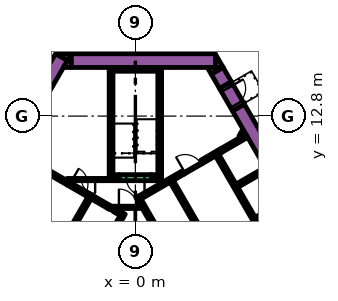
"""IFC4 building model, lengths in metres.
Left out: names, types, materials, properties, quantities, classifications, styles, units other than length and angle.
Written with IfcOpenShell. Run it as: python <this file> out.ifc"""

import sys

from ifc_helpers import new_model, si_unit, direction, frame, frame_2d, origin, place, context, subcontext, project, spatial, polyline, rectangle, outline, extrude, element, fill, save


model = new_model("IFC4")
c1 = context("Model", 3, precision=1e-05, world=origin(), true_north=direction((0.0, 1.0)))
c2 = subcontext(c1, "Body", "Model", "MODEL_VIEW")
j1 = project(units=[si_unit("LENGTHUNIT", "METRE"), si_unit("PLANEANGLEUNIT", "RADIAN")], contexts=[c1])
p1 = place(None, origin())
s1 = spatial("IfcSite", under=j1, at=p1, CompositionType="ELEMENT")
p2 = place(p1, origin())
s2 = spatial("IfcBuilding", under=s1, at=p2, CompositionType="ELEMENT")
p3 = place(p2, frame((0.0, 0.0, 16.2)))
s3 = spatial("IfcBuildingStorey", under=s2, at=p3, CompositionType="ELEMENT", Elevation=16.2)
p4 = place(p3, frame((6.776, 13.364, 0.0), z_axis=(0.0, 0.0, 1.0), x_axis=(0.500004177138, -0.8660229921, 0.0)))
e1 = element("IfcWall", 1, at=p4, inside=s3, PredefinedType="SOLIDWALL", context=c2, shape_type="SweptSolid", body=[
    extrude(rectangle(XDim=20.204, YDim=0.9, at=frame_2d((10.102, 0.0))), origin(), (0.0, 0.0, 1.0), 5.4),
])
p5 = place(p3, frame((-15.36, -1.503, 0.0), z_axis=(0.0, 0.0, 1.0), x_axis=(0.50000389221, 0.866023156604, 0.0)))
e2 = element("IfcWall", 2, at=p5, inside=s3, PredefinedType="SOLIDWALL", context=c2, shape_type="SweptSolid", body=[
    extrude(rectangle(XDim=21.0, YDim=0.9, at=frame_2d((10.5, 0.0))), origin(), (0.0, 0.0, 1.0), 5.4),
])
p6 = place(p3, origin())
e3 = element("IfcWall", 3, at=p6, inside=s3, PredefinedType="SOLIDWALL", context=c2, shape_type="SweptSolid", body=[
    extrude(outline(polyline([(-4.215, 16.9), (-4.469, 16.46), (-5.231, 16.9), (-4.215, 16.9)])), origin(), (0.0, 0.0, 1.0), 5.4),
])
p7 = place(p3, frame((-4.224, 16.45, 0.0), z_axis=(0.0, 0.0, 1.0), x_axis=(1.0, 0.0, 0.0)))
e4 = element("IfcWall", 4, at=p7, inside=s3, PredefinedType="SOLIDWALL", context=c2, shape_type="SweptSolid", body=[
    extrude(rectangle(XDim=9.488, YDim=0.9, at=frame_2d((4.744, 0.0))), origin(), (0.0, 0.0, 1.0), 5.4),
])
e5 = element("IfcWall", 5, at=p6, inside=s3, PredefinedType="SOLIDWALL", context=c2, shape_type="SweptSolid", body=[
    extrude(outline(polyline([(5.265, 16.0), (5.265, 16.88), (5.773, 16.0), (5.265, 16.0)])), origin(), (0.0, 0.0, 1.0), 5.4),
])
e6 = element("IfcWall", 6, at=p6, inside=s3, PredefinedType="SOLIDWALL", context=c2, shape_type="SweptSolid", body=[
    extrude(outline(polyline([(-4.734, 16.0), (-4.226, 16.88), (-4.226, 16.0), (-4.734, 16.0)])), origin(), (0.0, 0.0, 1.0), 5.4),
])
p8 = place(p3, frame((5.926, 14.836, 0.0), z_axis=(0.0, 0.0, 1.0), x_axis=(-0.500076735116, 0.865981096212, 0.0)))
e7 = element("IfcWall", 7, at=p8, inside=s3, PredefinedType="SOLIDWALL", context=c2, shape_type="SweptSolid", body=[
    extrude(rectangle(XDim=1.094, YDim=0.9, at=frame_2d((0.547, 0.0))), origin(), (0.0, 0.0, 1.0), 5.4),
])
e8 = element("IfcWall", 8, at=p6, inside=s3, PredefinedType="SOLIDWALL", context=c2, shape_type="SweptSolid", body=[
    extrude(outline(polyline([(4.734, 16.0), (5.75, 16.0), (4.988, 15.56), (4.734, 16.0)])), origin(), (0.0, 0.0, 1.0), 5.4),
])
p9 = place(p3, frame((-1.725, 15.875, 0.0), z_axis=(0.0, 0.0, 1.0), x_axis=(1.0, 0.0, 0.0)))
e9 = element("IfcWall", 9, at=p9, inside=s3, PredefinedType="SOLIDWALL", context=c2, shape_type="SweptSolid", body=[
    extrude(rectangle(XDim=3.45, YDim=0.25, at=frame_2d((1.725, 0.0))), origin(), (0.0, 0.0, 1.0), 5.4),
])
p10 = place(p3, frame((1.6, 8.95, 0.0), z_axis=(0.0, 0.0, 1.0), x_axis=(0.0, 1.0, 0.0)))
e10 = element("IfcWall", 10, at=p10, inside=s3, PredefinedType="SOLIDWALL", context=c2, shape_type="SweptSolid", body=[
    extrude(rectangle(XDim=6.8, YDim=0.25, at=frame_2d((3.4, 0.0))), origin(), (0.0, 0.0, 1.0), 5.4),
])
p11 = place(p3, frame((1.05, 8.825, 0.0), z_axis=(0.0, 0.0, 1.0), x_axis=(1.0, 0.0, 0.0)))
e11 = element("IfcWall", 11, at=p11, inside=s3, PredefinedType="SOLIDWALL", context=c2, shape_type="SweptSolid", body=[
    extrude(rectangle(XDim=0.675, YDim=0.25, at=frame_2d((0.337, 0.0))), origin(), (0.0, 0.0, 1.0), 5.4),
])
p12 = place(p3, frame((-1.6, 8.7, 0.0), z_axis=(0.0, 0.0, 1.0), x_axis=(0.0, 1.0, 0.0)))
e12 = element("IfcWall", 12, at=p12, inside=s3, PredefinedType="SOLIDWALL", context=c2, shape_type="SweptSolid", body=[
    extrude(rectangle(XDim=7.05, YDim=0.25, at=frame_2d((3.525, 0.0))), origin(), (0.0, 0.0, 1.0), 5.4),
])
p13 = place(p3, frame((-1.475, 8.825, 0.0), z_axis=(0.0, 0.0, 1.0), x_axis=(1.0, 0.0, 0.0)))
e13 = element("IfcWall", 13, at=p13, inside=s3, PredefinedType="SOLIDWALL", context=c2, shape_type="SweptSolid", body=[
    extrude(rectangle(XDim=0.425, YDim=0.25, at=frame_2d((0.212, 0.0))), origin(), (0.0, 0.0, 1.0), 5.4),
])
e14 = element("IfcWall", 14, at=p6, inside=s3, PredefinedType="SOLIDWALL", context=c2, shape_type="SweptSolid", body=[
    extrude(outline(polyline([(6.552, -3.348), (6.677, -3.564), (6.46, -3.689), (0.448, 6.725), (0.565, 6.725), (0.566, 6.725), (0.566, 6.725), (0.566, 6.875), (0.566, 6.875), (0.565, 6.875), (0.361, 6.875), (0.035, 7.439), (0.252, 7.564), (0.377, 7.348), (6.552, -3.348)])), origin(), (0.0, 0.0, 1.0), 5.4),
])
p14 = place(p3, frame((11.553, -0.46, 0.0), z_axis=(0.0, 0.0, 1.0), x_axis=(-0.500004791531, 0.866022637375, 0.0)))
e15 = element("IfcWall", 15, at=p14, inside=s3, PredefinedType="SOLIDWALL", context=c2, shape_type="SweptSolid", body=[
    extrude(rectangle(XDim=12.6, YDim=0.25, at=frame_2d((6.3, 0.0))), origin(), (0.0, 0.0, 1.0), 5.4),
])
p15 = place(p3, frame((4.358, 9.791, 0.0), z_axis=(0.0, 0.0, 1.0), x_axis=(0.866100000774, 0.49987077196, 0.0)))
e16 = element("IfcWall", 16, at=p15, inside=s3, PredefinedType="SOLIDWALL", context=c2, shape_type="SweptSolid", body=[
    extrude(rectangle(XDim=0.95, YDim=0.25, at=frame_2d((0.475, 0.0))), origin(), (0.0, 0.0, 1.0), 5.4),
])
p16 = place(p3, frame((0.314, 7.456, 0.0), z_axis=(0.0, 0.0, 1.0), x_axis=(0.866013897511, 0.50001992892, 0.0)))
e17 = element("IfcWall", 17, at=p16, inside=s3, PredefinedType="SOLIDWALL", context=c2, shape_type="SweptSolid", body=[
    extrude(rectangle(XDim=3.268, YDim=0.25, at=frame_2d((1.634, 0.0))), origin(), (0.0, 0.0, 1.0), 5.4),
])
p17 = place(p3, frame((5.469, 10.577, 0.0), z_axis=(0.0, 0.0, 1.0), x_axis=(0.499919672301, -0.866071776036, 0.0)))
e18 = element("IfcWall", 18, at=p17, inside=s3, PredefinedType="SOLIDWALL", context=c2, shape_type="SweptSolid", body=[
    extrude(rectangle(XDim=0.25, YDim=0.25, at=frame_2d((0.125, 0.0))), origin(), (0.0, 0.0, 1.0), 5.4),
])
p18 = place(p3, frame((5.64, 10.531, 0.0), z_axis=(0.0, 0.0, 1.0), x_axis=(0.866000020948, 0.500043961785, 0.0)))
e19 = element("IfcWall", 19, at=p18, inside=s3, PredefinedType="SOLIDWALL", context=c2, shape_type="SweptSolid", body=[
    extrude(rectangle(XDim=1.95, YDim=0.25, at=frame_2d((0.975, 0.0))), origin(), (0.0, 0.0, 1.0), 5.4),
])
for number, where, z_axis, x_axis in (
    (20, (8.589, 9.323, 0.0), (0.0, 0.0, 1.0), (-0.866, -0.5, 0.0)),
    (21, (7.944, 6.041, 0.0), (0.0, 0.0, 1.0), (0.866, 0.5, 0.0)),
):
    element("IfcWall", number, at=place(p3, frame(where, z_axis=z_axis, x_axis=x_axis)), inside=s3, PredefinedType="SOLIDWALL", context=c2, shape_type="SweptSolid", body=[
        extrude(rectangle(XDim=2.2, YDim=0.25, at=frame_2d((1.1, 0.0))), origin(), (0.0, 0.0, 1.0), 5.4),
    ])
p19 = place(p3, frame((-8.06, -1.311, 0.0), z_axis=(0.0, 0.0, 1.0), x_axis=(0.50000273126, 0.866023826885, 0.0)))
e22 = element("IfcWall", 22, at=p19, inside=s3, PredefinedType="SOLIDWALL", context=c2, shape_type="SweptSolid", body=[
    extrude(rectangle(XDim=10.33, YDim=0.25, at=frame_2d((5.165, 0.0))), origin(), (0.0, 0.0, 1.0), 5.4),
])
p20 = place(p3, frame((-1.758, 6.835, 0.0), z_axis=(0.0, 0.0, 1.0), x_axis=(0.865982457891, -0.500074377092, 0.0)))
e23 = element("IfcWall", 23, at=p20, inside=s3, PredefinedType="SOLIDWALL", context=c2, shape_type="SweptSolid", body=[
    extrude(rectangle(XDim=0.2, YDim=0.25, at=frame_2d((0.1, 0.0))), origin(), (0.0, 0.0, 1.0), 5.4),
])
p21 = place(p3, frame((-1.76, 6.836, 0.0), z_axis=(0.0, 0.0, 1.0), x_axis=(-0.865952863304, 0.500125622755, 0.0)))
e24 = element("IfcWall", 24, at=p21, inside=s3, PredefinedType="SOLIDWALL", context=c2, shape_type="SweptSolid", body=[
    extrude(rectangle(XDim=1.258, YDim=0.25, at=frame_2d((0.629, 0.0))), origin(), (0.0, 0.0, 1.0), 5.4),
])
p22 = place(p3, frame((-0.728, 6.24, 0.0), z_axis=(0.0, 0.0, 1.0), x_axis=(-0.865955664968, 0.500120771724, 0.0)))
e25 = element("IfcWall", 25, at=p22, inside=s3, PredefinedType="SOLIDWALL", context=c2, shape_type="SweptSolid", body=[
    extrude(rectangle(XDim=0.778, YDim=0.25, at=frame_2d((0.389, 0.0))), origin(), (0.0, 0.0, 1.0), 5.4),
])
e26 = element("IfcWall", 26, at=p6, inside=s3, PredefinedType="SOLIDWALL", context=c2, shape_type="SweptSolid", body=[
    extrude(outline(polyline([(-3.128, 7.481), (-3.259, 7.557), (-3.134, 7.773), (-3.003, 7.698), (-3.128, 7.481)])), origin(), (0.0, 0.0, 1.0), 5.4),
])
p23 = place(p3, frame((-7.959, 10.415, 0.0), z_axis=(0.0, 0.0, 1.0), x_axis=(0.866020958405, -0.500007699544, 0.0)))
e27 = element("IfcWall", 27, at=p23, inside=s3, PredefinedType="SOLIDWALL", context=c2, shape_type="SweptSolid", body=[
    extrude(rectangle(XDim=4.1, YDim=0.25, at=frame_2d((2.05, 0.0))), origin(), (0.0, 0.0, 1.0), 5.4),
])
p24 = place(p3, frame((-3.997, 8.625, 0.0), z_axis=(0.0, 0.0, 1.0), x_axis=(-1.0, 0.0, 0.0)))
e28 = element("IfcWall", 28, at=p24, inside=s3, PredefinedType="PARTITIONING", context=c2, shape_type="SweptSolid", body=[
    extrude(rectangle(XDim=0.502, YDim=0.15, at=frame_2d((0.251, 0.0))), origin(), (0.0, 0.0, 1.0), 4.1),
])
p25 = place(p3, frame((-2.196, 8.625, 0.0), z_axis=(0.0, 0.0, 1.0), x_axis=(1.0, 0.0, 0.0)))
e29 = element("IfcWall", 29, at=p25, inside=s3, PredefinedType="PARTITIONING", context=c2, shape_type="SweptSolid", body=[
    extrude(rectangle(XDim=1.146, YDim=0.15, at=frame_2d((0.573, 0.0))), origin(), (0.0, 0.0, 1.0), 4.1),
])
p26 = place(p3, frame((1.05, 8.625, 0.0), z_axis=(0.0, 0.0, 1.0), x_axis=(1.0, 0.0, 0.0)))
e30 = element("IfcWall", 30, at=p26, inside=s3, PredefinedType="PARTITIONING", context=c2, shape_type="SweptSolid", body=[
    extrude(rectangle(XDim=0.514, YDim=0.15, at=frame_2d((0.257, 0.0))), origin(), (0.0, 0.0, 1.0), 4.1),
])
p27 = place(p3, frame((6.872, 11.45, 0.0), z_axis=(0.0, 0.0, 1.0), x_axis=(0.499846793097, 0.866113839764, 0.0)))
e31 = element("IfcWall", 31, at=p27, inside=s3, PredefinedType="PARTITIONING", context=c2, shape_type="SweptSolid", body=[
    extrude(rectangle(XDim=0.453, YDim=0.15, at=frame_2d((0.227, 0.0))), origin(), (0.0, 0.0, 1.0), 4.1),
])
p28 = place(p3, frame((7.131, 11.6, 0.0), z_axis=(0.0, 0.0, 1.0), x_axis=(0.498600033135, 0.866832167699, 0.0)))
e32 = element("IfcWall", 32, at=p28, inside=s3, PredefinedType="PARTITIONING", context=c2, shape_type="SweptSolid", body=[
    extrude(rectangle(XDim=0.107, YDim=0.15, at=frame_2d((0.053, 0.0))), origin(), (0.0, 0.0, 1.0), 4.1),
])
p29 = place(p3, frame((8.565, -2.185, 0.0), z_axis=(0.0, 0.0, 1.0), x_axis=(-0.499997954832, 0.866026584559, 0.0)))
e33 = element("IfcWall", 33, at=p29, inside=s3, PredefinedType="SOLIDWALL", context=c2, shape_type="SweptSolid", body=[
    extrude(rectangle(XDim=12.35, YDim=0.25, at=frame_2d((6.175, 0.0))), origin(), (0.0, 0.0, 1.0), 5.4),
])
p30 = place(p29, frame((5.725, 0.0, 0.0)))
e34 = element("IfcOpeningElement", 34, at=p30, cuts=e33, PredefinedType="OPENING", context=c2, shape_type="SweptSolid", body=[
    extrude(rectangle(XDim=0.9, YDim=2.1, at=frame_2d((0.45, 1.05))), frame((0.0, 0.135, 0.0), z_axis=(0.0, -1.0, 0.0), x_axis=(1.0, 0.0, 0.0)), (0.0, 0.0, 1.0), 0.27),
])
p31 = place(p3, frame((-0.898, 6.194, 0.0), z_axis=(0.0, 0.0, 1.0), x_axis=(-0.499996202215, -0.866027596426, 0.0)))
e35 = element("IfcWall", 35, at=p31, inside=s3, PredefinedType="SOLIDWALL", context=c2, shape_type="SweptSolid", body=[
    extrude(rectangle(XDim=9.83, YDim=0.25, at=frame_2d((4.915, 0.0))), origin(), (0.0, 0.0, 1.0), 5.4),
])
p32 = place(p31, frame((0.585, 0.0, 0.0)))
e36 = element("IfcOpeningElement", 36, at=p32, cuts=e35, PredefinedType="OPENING", context=c2, shape_type="SweptSolid", body=[
    extrude(rectangle(XDim=1.1, YDim=2.1, at=frame_2d((0.55, 1.05))), frame((0.0, 0.135, 0.0), z_axis=(0.0, -1.0, 0.0), x_axis=(1.0, 0.0, 0.0)), (0.0, 0.0, 1.0), 0.27),
])
p33 = place(p31, frame((3.105, 0.0, 0.0)))
e37 = element("IfcOpeningElement", 37, at=p33, cuts=e35, PredefinedType="OPENING", context=c2, shape_type="SweptSolid", body=[
    extrude(rectangle(XDim=1.1, YDim=2.1, at=frame_2d((0.55, 1.05))), frame((0.0, 0.135, 0.0), z_axis=(0.0, -1.0, 0.0), x_axis=(1.0, 0.0, 0.0)), (0.0, 0.0, 1.0), 0.27),
])
p34 = place(p31, frame((5.625, 0.0, 0.0)))
e38 = element("IfcOpeningElement", 38, at=p34, cuts=e35, PredefinedType="OPENING", context=c2, shape_type="SweptSolid", body=[
    extrude(rectangle(XDim=1.1, YDim=2.1, at=frame_2d((0.55, 1.05))), frame((0.0, 0.135, 0.0), z_axis=(0.0, -1.0, 0.0), x_axis=(1.0, 0.0, 0.0)), (0.0, 0.0, 1.0), 0.27),
])
p35 = place(p31, frame((8.145, 0.0, 0.0)))
e39 = element("IfcOpeningElement", 39, at=p35, cuts=e35, PredefinedType="OPENING", context=c2, shape_type="SweptSolid", body=[
    extrude(rectangle(XDim=1.1, YDim=2.1, at=frame_2d((0.55, 1.05))), frame((0.0, 0.135, 0.0), z_axis=(0.0, -1.0, 0.0), x_axis=(1.0, 0.0, 0.0)), (0.0, 0.0, 1.0), 0.27),
])
p36 = place(p3, frame((1.05, 8.75, 0.0), z_axis=(0.0, 0.0, 1.0), x_axis=(-1.0, 0.0, 0.0)))
e40 = element("IfcWall", 40, at=p36, inside=s3, PredefinedType="SOLIDWALL", context=c2, shape_type="SweptSolid", body=[
    extrude(rectangle(XDim=2.1, YDim=0.4, at=frame_2d((1.05, 0.0))), origin(), (0.0, 0.0, 1.0), 5.4),
])
p37 = place(p36, frame((0.45, 0.0, 0.0)))
e41 = element("IfcOpeningElement", 41, at=p37, cuts=e40, PredefinedType="OPENING", context=c2, shape_type="SweptSolid", body=[
    extrude(rectangle(XDim=1.2, YDim=2.1, at=frame_2d((0.6, 1.05))), frame((0.0, 0.21, 0.0), z_axis=(0.0, -1.0, 0.0), x_axis=(1.0, 0.0, 0.0)), (0.0, 0.0, 1.0), 0.42),
])
p38 = place(p3, frame((-2.196, 8.625, 0.0), z_axis=(0.0, 0.0, 1.0), x_axis=(-1.0, 0.0, 0.0)))
e42 = element("IfcWall", 42, at=p38, inside=s3, PredefinedType="PARTITIONING", context=c2, shape_type="SweptSolid", body=[
    extrude(rectangle(XDim=1.8, YDim=0.15, at=frame_2d((0.9, 0.0))), origin(), (0.0, 0.0, 1.0), 4.1),
])
p39 = place(p38, frame((0.45, 0.0, 0.0)))
e43 = element("IfcOpeningElement", 43, at=p39, cuts=e42, PredefinedType="OPENING", context=c2, shape_type="SweptSolid", body=[
    extrude(rectangle(XDim=0.9, YDim=2.1, at=frame_2d((0.45, 1.05))), frame((0.0, 0.085, 0.0), z_axis=(0.0, -1.0, 0.0), x_axis=(1.0, 0.0, 0.0)), (0.0, 0.0, 1.0), 0.17),
])
p40 = place(p3, frame((-1.534, 6.8, 0.0), z_axis=(0.0, 0.0, 1.0), x_axis=(1.0, 0.0, 0.0)))
e44 = element("IfcWall", 44, at=p40, inside=s3, PredefinedType="PARTITIONING", context=c2, shape_type="SweptSolid", body=[
    extrude(rectangle(XDim=2.1, YDim=0.15, at=frame_2d((1.05, 0.0))), origin(), (0.0, 0.0, 1.0), 4.1),
])
p41 = place(p40, frame((0.45, 0.0, 0.0)))
e45 = element("IfcOpeningElement", 45, at=p41, cuts=e44, PredefinedType="OPENING", context=c2, shape_type="SweptSolid", body=[
    extrude(rectangle(XDim=1.2, YDim=2.1, at=frame_2d((0.6, 1.05))), frame((0.0, 0.085, 0.0), z_axis=(0.0, -1.0, 0.0), x_axis=(1.0, 0.0, 0.0)), (0.0, 0.0, 1.0), 0.17),
])
p42 = place(p3, frame((3.183, 9.02, 0.0), z_axis=(0.0, 0.0, 1.0), x_axis=(0.866034573852, 0.49998411664, 0.0)))
e46 = element("IfcWall", 46, at=p42, inside=s3, PredefinedType="PARTITIONING", context=c2, shape_type="SweptSolid", body=[
    extrude(rectangle(XDim=1.4, YDim=0.09, at=frame_2d((0.7, 0.0))), origin(), (0.0, 0.0, 1.0), 4.1),
])
p43 = place(p42, frame((0.1, 0.0, 0.0)))
e47 = element("IfcOpeningElement", 47, at=p43, cuts=e46, PredefinedType="OPENING", context=c2, shape_type="SweptSolid", body=[
    extrude(rectangle(XDim=1.2, YDim=2.1, at=frame_2d((0.6, 1.05))), frame((0.0, 0.055, 0.0), z_axis=(0.0, -1.0, 0.0), x_axis=(1.0, 0.0, 0.0)), (0.0, 0.0, 1.0), 0.11),
])
p44 = place(p3, frame((-4.409, 8.365, 0.0), z_axis=(0.0, 0.0, 1.0), x_axis=(0.866034573852, -0.49998411664, 0.0)))
e48 = element("IfcWall", 48, at=p44, inside=s3, PredefinedType="SOLIDWALL", context=c2, shape_type="SweptSolid", body=[
    extrude(rectangle(XDim=1.4, YDim=0.25, at=frame_2d((0.7, 0.0))), origin(), (0.0, 0.0, 1.0), 5.4),
])
p45 = place(p44, frame((0.1, 0.0, 0.0)))
e49 = element("IfcOpeningElement", 49, at=p45, cuts=e48, PredefinedType="OPENING", context=c2, shape_type="SweptSolid", body=[
    extrude(rectangle(XDim=1.2, YDim=2.1, at=frame_2d((0.6, 1.05))), frame((0.0, 0.135, 0.0), z_axis=(0.0, -1.0, 0.0), x_axis=(1.0, 0.0, 0.0)), (0.0, 0.0, 1.0), 0.27),
])
p46 = place(p3, frame((5.926, 14.836, 0.0), z_axis=(0.0, 0.0, 1.0), x_axis=(0.500062241894, -0.865989465428, 0.0)))
e50 = element("IfcWall", 50, at=p46, inside=s3, PredefinedType="SOLIDWALL", context=c2, shape_type="SweptSolid", body=[
    extrude(rectangle(XDim=1.7, YDim=0.9, at=frame_2d((0.85, 0.0))), origin(), (0.0, 0.0, 1.0), 5.4),
])
p47 = place(p46, frame((0.25, 0.0, 0.0)))
e51 = element("IfcOpeningElement", 51, at=p47, cuts=e50, PredefinedType="OPENING", context=c2, shape_type="SweptSolid", body=[
    extrude(rectangle(XDim=1.2, YDim=2.1, at=frame_2d((0.6, 1.05))), frame((0.0, 0.46, 0.0), z_axis=(0.0, -1.0, 0.0), x_axis=(1.0, 0.0, 0.0)), (0.0, 0.0, 1.0), 0.92),
])
p48 = place(p3, frame((38.25, -14.145, 0.0), z_axis=(0.0, 0.0, 1.0), x_axis=(-0.500000527961, 0.866025098966, 0.0)))
e52 = element("IfcWall", 52, at=p48, inside=s3, PredefinedType="SOLIDWALL", context=c2, shape_type="SweptSolid", body=[
    extrude(rectangle(XDim=62.75, YDim=0.25, at=frame_2d((31.375, 0.0))), origin(), (0.0, 0.0, 1.0), 5.0),
])
p49 = place(p37, origin())
e53 = element("IfcDoor", 53, at=p49, inside=s3, OperationType="SINGLE_SWING_LEFT", PredefinedType="DOOR", context=c2, shape_type="SweptSolid", body=[
    extrude(rectangle(XDim=1.2, YDim=2.1, at=frame_2d((0.6, 1.05))), frame((0.0, 0.025, 0.0), z_axis=(0.0, -1.0, 0.0), x_axis=(1.0, 0.0, 0.0)), (0.0, 0.0, 1.0), 0.05),
])
fill(e41, e53)
p50 = place(p39, origin())
e54 = element("IfcDoor", 54, at=p50, inside=s3, OperationType="SINGLE_SWING_LEFT", PredefinedType="DOOR", context=c2, shape_type="SweptSolid", body=[
    extrude(rectangle(XDim=0.9, YDim=2.1, at=frame_2d((0.45, 1.05))), frame((0.0, 0.025, 0.0), z_axis=(0.0, -1.0, 0.0), x_axis=(1.0, 0.0, 0.0)), (0.0, 0.0, 1.0), 0.05),
])
fill(e43, e54)
p51 = place(p41, origin())
e55 = element("IfcDoor", 55, at=p51, inside=s3, OperationType="SINGLE_SWING_LEFT", PredefinedType="DOOR", context=c2, shape_type="SweptSolid", body=[
    extrude(rectangle(XDim=1.2, YDim=2.1, at=frame_2d((0.6, 1.05))), frame((0.0, 0.025, 0.0), z_axis=(0.0, -1.0, 0.0), x_axis=(1.0, 0.0, 0.0)), (0.0, 0.0, 1.0), 0.05),
])
fill(e45, e55)
p52 = place(p43, origin())
e56 = element("IfcDoor", 56, at=p52, inside=s3, OperationType="SINGLE_SWING_LEFT", PredefinedType="DOOR", context=c2, shape_type="SweptSolid", body=[
    extrude(rectangle(XDim=1.2, YDim=2.1, at=frame_2d((0.6, 1.05))), frame((0.0, 0.025, 0.0), z_axis=(0.0, -1.0, 0.0), x_axis=(1.0, 0.0, 0.0)), (0.0, 0.0, 1.0), 0.05),
])
fill(e47, e56)
p53 = place(p45, origin())
e57 = element("IfcDoor", 57, at=p53, inside=s3, OperationType="SINGLE_SWING_LEFT", PredefinedType="DOOR", context=c2, shape_type="SweptSolid", body=[
    extrude(rectangle(XDim=1.2, YDim=2.1, at=frame_2d((0.6, 1.05))), frame((0.0, 0.025, 0.0), z_axis=(0.0, -1.0, 0.0), x_axis=(1.0, 0.0, 0.0)), (0.0, 0.0, 1.0), 0.05),
])
fill(e49, e57)
p54 = place(p47, origin())
e58 = element("IfcDoor", 58, at=p54, inside=s3, OperationType="SINGLE_SWING_LEFT", PredefinedType="DOOR", context=c2, shape_type="SweptSolid", body=[
    extrude(rectangle(XDim=1.2, YDim=2.1, at=frame_2d((0.6, 1.05))), frame((0.0, 0.025, 0.0), z_axis=(0.0, -1.0, 0.0), x_axis=(1.0, 0.0, 0.0)), (0.0, 0.0, 1.0), 0.05),
])
fill(e51, e58)
save(model, sys.argv[1])
